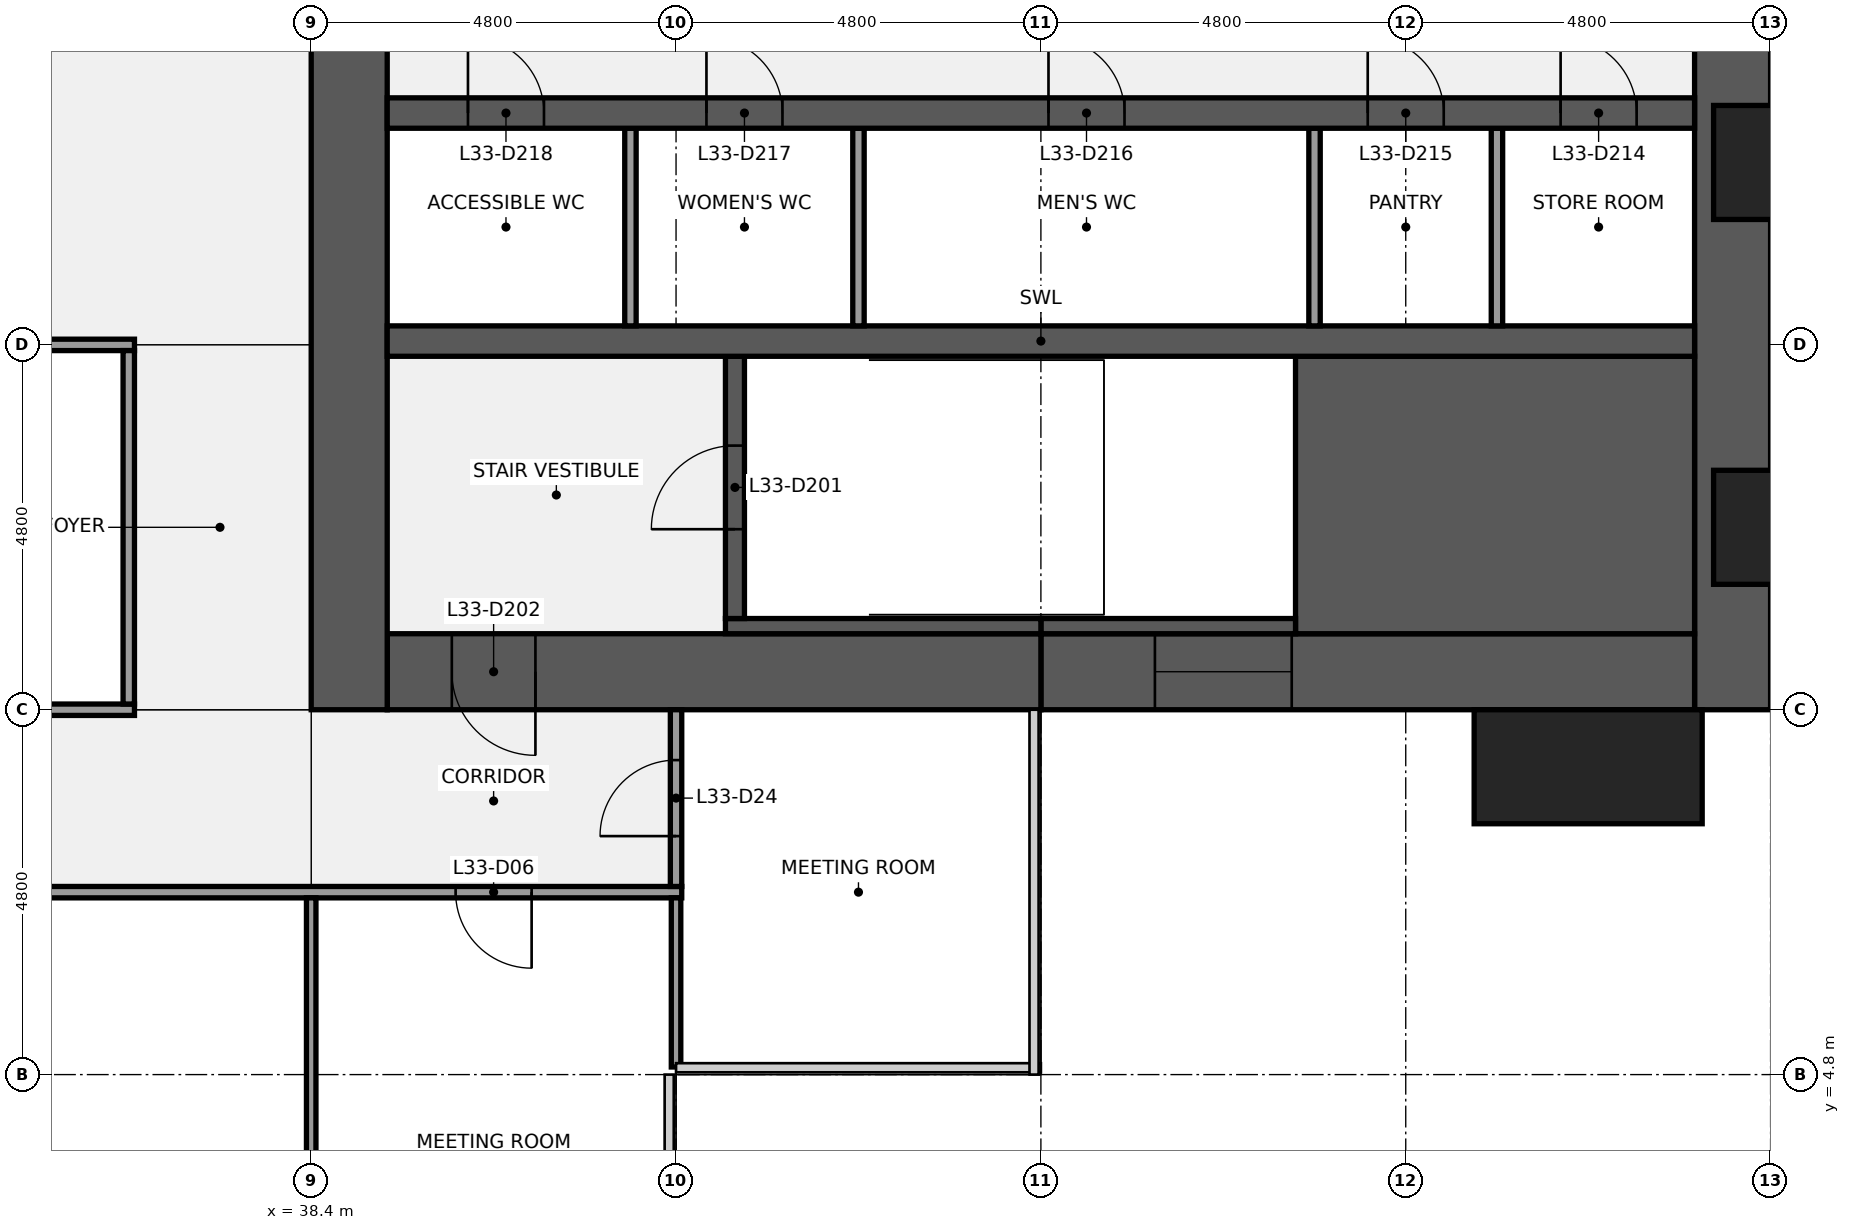
"""IFC4 building model, lengths in metres.
Left out: names, types, materials, properties, quantities, classifications, styles, units other than length and angle.
Written with IfcOpenShell. Run it as: python <this file> out.ifc"""

import sys

from ifc_helpers import new_model, si_unit, direction, frame, frame_2d, origin, origin_2d, place, context, subcontext, project, spatial, rectangle, extrude, element, fill, save


model = new_model("IFC4")
c1 = context("Model", 3, precision=1e-05, world=origin(), true_north=direction((0.0, 1.0)))
c2 = subcontext(c1, "Body", "Model", "MODEL_VIEW")
j1 = project(units=[si_unit("LENGTHUNIT", "METRE"), si_unit("PLANEANGLEUNIT", "RADIAN")], contexts=[c1])
p1 = place(None, origin())
s1 = spatial("IfcSite", under=j1, at=p1, CompositionType="ELEMENT")
p2 = place(p1, origin())
s2 = spatial("IfcBuilding", under=s1, at=p2, CompositionType="ELEMENT")
p3 = place(p2, frame((0.0, 0.0, 152.1)))
s3 = spatial("IfcBuildingStorey", under=s2, at=p3, CompositionType="ELEMENT", Elevation=152.1)
p4 = place(p3, frame((57.1, 38.4, 0.0), z_axis=(0.0, 0.0, 1.0), x_axis=(0.0, -1.0, 0.0)))
e1 = element("IfcWall", 1, at=p4, inside=s3, PredefinedType="SHEAR", context=c2, shape_type="SweptSolid", body=[
    extrude(rectangle(XDim=28.8, YDim=1.0, at=frame_2d((14.4, 0.0))), origin(), (0.0, 0.0, 1.0), 3.84),
])
p5 = place(p4, frame((18.45, 0.0, 0.9)))
e2 = element("IfcOpeningElement", 2, at=p5, cuts=e1, PredefinedType="OPENING", context=c2, shape_type="SweptSolid", body=[
    extrude(rectangle(XDim=1.5, YDim=1.5, at=frame_2d((0.75, 0.75))), frame((0.0, 0.51, 0.0), z_axis=(0.0, -1.0, 0.0), x_axis=(1.0, 0.0, 0.0)), (0.0, 0.0, 1.0), 1.02),
])
p6 = place(p4, frame((8.85, 0.0, 0.9)))
e3 = element("IfcOpeningElement", 3, at=p6, cuts=e1, PredefinedType="OPENING", context=c2, shape_type="SweptSolid", body=[
    extrude(rectangle(XDim=1.5, YDim=1.5, at=frame_2d((0.75, 0.75))), frame((0.0, 0.51, 0.0), z_axis=(0.0, -1.0, 0.0), x_axis=(1.0, 0.0, 0.0)), (0.0, 0.0, 1.0), 1.02),
])
p7 = place(p3, frame((56.6, 10.1, 0.0), z_axis=(0.0, 0.0, 1.0), x_axis=(-1.0, 0.0, 0.0)))
e4 = element("IfcWall", 4, at=p7, inside=s3, PredefinedType="SHEAR", context=c2, shape_type="SweptSolid", body=[
    extrude(rectangle(XDim=8.6, YDim=1.0, at=frame_2d((4.3, 0.0))), origin(), (0.0, 0.0, 1.0), 3.84),
])
p8 = place(p7, frame((5.3, 0.0, 0.9)))
e5 = element("IfcOpeningElement", 5, at=p8, cuts=e4, PredefinedType="OPENING", context=c2, shape_type="SweptSolid", body=[
    extrude(rectangle(XDim=1.8, YDim=1.5, at=frame_2d((0.9, 0.75))), frame((0.0, 0.51, 0.0), z_axis=(0.0, -1.0, 0.0), x_axis=(1.0, 0.0, 0.0)), (0.0, 0.0, 1.0), 1.02),
])
p9 = place(p3, frame((48.0, 10.1, 0.0), z_axis=(0.0, 0.0, 1.0), x_axis=(-1.0, 0.0, 0.0)))
e6 = element("IfcWall", 6, at=p9, inside=s3, PredefinedType="SHEAR", context=c2, shape_type="SweptSolid", body=[
    extrude(rectangle(XDim=8.6, YDim=1.0, at=frame_2d((4.3, 0.0))), origin(), (0.0, 0.0, 1.0), 3.84),
])
p10 = place(p9, frame((6.65, 0.0, 0.0)))
e7 = element("IfcOpeningElement", 7, at=p10, cuts=e6, PredefinedType="OPENING", context=c2, shape_type="SweptSolid", body=[
    extrude(rectangle(XDim=1.1, YDim=2.1, at=frame_2d((0.55, 1.05))), frame((0.0, 0.51, 0.0), z_axis=(0.0, -1.0, 0.0), x_axis=(1.0, 0.0, 0.0)), (0.0, 0.0, 1.0), 1.02),
])
p11 = place(p3, frame((38.9, 9.6, 0.0), z_axis=(0.0, 0.0, 1.0), x_axis=(0.0, 1.0, 0.0)))
e8 = element("IfcWall", 8, at=p11, inside=s3, PredefinedType="SHEAR", context=c2, shape_type="SweptSolid", body=[
    extrude(rectangle(XDim=28.8, YDim=1.0, at=frame_2d((14.4, 0.0))), origin(), (0.0, 0.0, 1.0), 3.84),
])
p12 = place(p11, frame((8.7, 0.0, 0.0)))
e9 = element("IfcOpeningElement", 9, at=p12, cuts=e8, PredefinedType="OPENING", context=c2, shape_type="SweptSolid", body=[
    extrude(rectangle(XDim=1.8, YDim=2.1, at=frame_2d((0.9, 1.05))), frame((0.0, 0.51, 0.0), z_axis=(0.0, -1.0, 0.0), x_axis=(1.0, 0.0, 0.0)), (0.0, 0.0, 1.0), 1.02),
])
p13 = place(p11, frame((18.3, 0.0, 0.0)))
e10 = element("IfcOpeningElement", 10, at=p13, cuts=e8, PredefinedType="OPENING", context=c2, shape_type="SweptSolid", body=[
    extrude(rectangle(XDim=1.8, YDim=2.1, at=frame_2d((0.9, 1.05))), frame((0.0, 0.51, 0.0), z_axis=(0.0, -1.0, 0.0), x_axis=(1.0, 0.0, 0.0)), (0.0, 0.0, 1.0), 1.02),
])
p14 = place(p3, frame((51.35, 12.425, 0.0), z_axis=(0.0, 0.0, 1.0), x_axis=(1.0, 0.0, 0.0)))
e11 = element("IfcWall", 11, at=p14, inside=s3, PredefinedType="SHEAR", context=c2, shape_type="SweptSolid", body=[
    extrude(rectangle(XDim=5.25, YDim=3.65, at=frame_2d((2.625, 0.0))), origin(), (0.0, 0.0, 1.0), 3.84),
])
p15 = place(p3, frame((48.0, 10.7, 0.0), z_axis=(0.0, 0.0, 1.0), x_axis=(1.0, 0.0, 0.0)))
e12 = element("IfcWall", 12, at=p15, inside=s3, PredefinedType="SHEAR", context=c2, shape_type="SweptSolid", body=[
    extrude(rectangle(XDim=3.35, YDim=0.2, at=frame_2d((1.675, 0.0))), origin(), (0.0, 0.0, 1.0), 3.84),
])
p16 = place(p3, frame((43.85, 10.7, 0.0), z_axis=(0.0, 0.0, 1.0), x_axis=(1.0, 0.0, 0.0)))
e13 = element("IfcWall", 13, at=p16, inside=s3, PredefinedType="SHEAR", context=c2, shape_type="SweptSolid", body=[
    extrude(rectangle(XDim=4.15, YDim=0.2, at=frame_2d((2.075, 0.0))), origin(), (0.0, 0.0, 1.0), 3.84),
])
p17 = place(p3, frame((43.975, 10.8, 0.0), z_axis=(0.0, 0.0, 1.0), x_axis=(0.0, 1.0, 0.0)))
e14 = element("IfcWall", 14, at=p17, inside=s3, PredefinedType="SHEAR", context=c2, shape_type="SweptSolid", body=[
    extrude(rectangle(XDim=3.45, YDim=0.25, at=frame_2d((1.725, 0.0))), origin(), (0.0, 0.0, 1.0), 3.84),
])
p18 = place(p17, frame((1.175, 0.0, 0.0)))
e15 = element("IfcOpeningElement", 15, at=p18, cuts=e14, PredefinedType="OPENING", context=c2, shape_type="SweptSolid", body=[
    extrude(rectangle(XDim=1.1, YDim=2.1, at=frame_2d((0.55, 1.05))), frame((0.0, 0.135, 0.0), z_axis=(0.0, -1.0, 0.0), x_axis=(1.0, 0.0, 0.0)), (0.0, 0.0, 1.0), 0.27),
])
p19 = place(p3, frame((39.4, 14.45, 0.0), z_axis=(0.0, 0.0, 1.0), x_axis=(1.0, 0.0, 0.0)))
e16 = element("IfcWall", 16, at=p19, inside=s3, PredefinedType="SHEAR", context=c2, shape_type="SweptSolid", body=[
    extrude(rectangle(XDim=17.2, YDim=0.4, at=frame_2d((8.6, 0.0))), origin(), (0.0, 0.0, 1.0), 3.84),
])
for number, where, z_axis, x_axis in (
    (17, (54.0, 14.65, 0.0), (0.0, 0.0, 1.0), (0.0, 1.0, 0.0)),
    (18, (51.6, 14.65, 0.0), (0.0, 0.0, 1.0), (0.0, 1.0, 0.0)),
    (19, (45.6, 14.65, 0.0), (0.0, 0.0, 1.0), (0.0, 1.0, 0.0)),
    (20, (42.6, 14.65, 0.0), (0.0, 0.0, 1.0), (0.0, 1.0, 0.0)),
):
    element("IfcWall", number, at=place(p3, frame(where, z_axis=z_axis, x_axis=x_axis)), inside=s3, PredefinedType="PARTITIONING", context=c2, shape_type="SweptSolid", body=[
        extrude(rectangle(XDim=2.6, YDim=0.15, at=frame_2d((1.3, 0.0))), origin(), (0.0, 0.0, 1.0), 3.84),
    ])
p20 = place(p3, frame((39.4, 17.45, 0.0), z_axis=(0.0, 0.0, 1.0), x_axis=(1.0, 0.0, 0.0)))
e21 = element("IfcWall", 21, at=p20, inside=s3, PredefinedType="SHEAR", context=c2, shape_type="SweptSolid", body=[
    extrude(rectangle(XDim=17.2, YDim=0.4, at=frame_2d((8.6, 0.0))), origin(), (0.0, 0.0, 1.0), 3.84),
])
p21 = place(p20, frame((15.438, 0.0, 0.0)))
e22 = element("IfcOpeningElement", 22, at=p21, cuts=e21, PredefinedType="OPENING", context=c2, shape_type="SweptSolid", body=[
    extrude(rectangle(XDim=1.0, YDim=2.1, at=frame_2d((0.5, 1.05))), frame((0.0, 0.21, 0.0), z_axis=(0.0, -1.0, 0.0), x_axis=(1.0, 0.0, 0.0)), (0.0, 0.0, 1.0), 0.42),
])
p22 = place(p20, frame((12.9, 0.0, 0.0)))
e23 = element("IfcOpeningElement", 23, at=p22, cuts=e21, PredefinedType="OPENING", context=c2, shape_type="SweptSolid", body=[
    extrude(rectangle(XDim=1.0, YDim=2.1, at=frame_2d((0.5, 1.05))), frame((0.0, 0.21, 0.0), z_axis=(0.0, -1.0, 0.0), x_axis=(1.0, 0.0, 0.0)), (0.0, 0.0, 1.0), 0.42),
])
p23 = place(p20, frame((8.7, 0.0, 0.0)))
e24 = element("IfcOpeningElement", 24, at=p23, cuts=e21, PredefinedType="OPENING", context=c2, shape_type="SweptSolid", body=[
    extrude(rectangle(XDim=1.0, YDim=2.1, at=frame_2d((0.5, 1.05))), frame((0.0, 0.21, 0.0), z_axis=(0.0, -1.0, 0.0), x_axis=(1.0, 0.0, 0.0)), (0.0, 0.0, 1.0), 0.42),
])
p24 = place(p20, frame((4.2, 0.0, 0.0)))
e25 = element("IfcOpeningElement", 25, at=p24, cuts=e21, PredefinedType="OPENING", context=c2, shape_type="SweptSolid", body=[
    extrude(rectangle(XDim=1.0, YDim=2.1, at=frame_2d((0.5, 1.05))), frame((0.0, 0.21, 0.0), z_axis=(0.0, -1.0, 0.0), x_axis=(1.0, 0.0, 0.0)), (0.0, 0.0, 1.0), 0.42),
])
p25 = place(p20, frame((1.062, 0.0, 0.0)))
e26 = element("IfcOpeningElement", 26, at=p25, cuts=e21, PredefinedType="OPENING", context=c2, shape_type="SweptSolid", body=[
    extrude(rectangle(XDim=1.0, YDim=2.1, at=frame_2d((0.5, 1.05))), frame((0.0, 0.21, 0.0), z_axis=(0.0, -1.0, 0.0), x_axis=(1.0, 0.0, 0.0)), (0.0, 0.0, 1.0), 0.42),
])
p26 = place(p3, frame((14.325, 7.2, 0.0), z_axis=(0.0, 0.0, 1.0), x_axis=(1.0, 0.0, 0.0)))
e27 = element("IfcWall", 27, at=p26, inside=s3, PredefinedType="PARTITIONING", context=c2, shape_type="SweptSolid", body=[
    extrude(rectangle(XDim=28.95, YDim=0.15, at=frame_2d((14.475, 0.0))), origin(), (0.0, 0.0, 1.0), 2.936),
])
p27 = place(p26, frame((1.975, 0.0, 0.0)))
e28 = element("IfcOpeningElement", 28, at=p27, cuts=e27, PredefinedType="OPENING", context=c2, shape_type="SweptSolid", body=[
    extrude(rectangle(XDim=1.0, YDim=2.1, at=frame_2d((0.5, 1.05))), frame((0.0, 0.085, 0.0), z_axis=(0.0, -1.0, 0.0), x_axis=(1.0, 0.0, 0.0)), (0.0, 0.0, 1.0), 0.17),
])
p28 = place(p26, frame((5.575, 0.0, 0.0)))
e29 = element("IfcOpeningElement", 29, at=p28, cuts=e27, PredefinedType="OPENING", context=c2, shape_type="SweptSolid", body=[
    extrude(rectangle(XDim=1.0, YDim=2.1, at=frame_2d((0.5, 1.05))), frame((0.0, 0.085, 0.0), z_axis=(0.0, -1.0, 0.0), x_axis=(1.0, 0.0, 0.0)), (0.0, 0.0, 1.0), 0.17),
])
p29 = place(p26, frame((9.175, 0.0, 0.0)))
e30 = element("IfcOpeningElement", 30, at=p29, cuts=e27, PredefinedType="OPENING", context=c2, shape_type="SweptSolid", body=[
    extrude(rectangle(XDim=1.0, YDim=2.1, at=frame_2d((0.5, 1.05))), frame((0.0, 0.085, 0.0), z_axis=(0.0, -1.0, 0.0), x_axis=(1.0, 0.0, 0.0)), (0.0, 0.0, 1.0), 0.17),
])
p30 = place(p26, frame((12.775, 0.0, 0.0)))
e31 = element("IfcOpeningElement", 31, at=p30, cuts=e27, PredefinedType="OPENING", context=c2, shape_type="SweptSolid", body=[
    extrude(rectangle(XDim=1.0, YDim=2.1, at=frame_2d((0.5, 1.05))), frame((0.0, 0.085, 0.0), z_axis=(0.0, -1.0, 0.0), x_axis=(1.0, 0.0, 0.0)), (0.0, 0.0, 1.0), 0.17),
])
p31 = place(p26, frame((18.775, 0.0, 0.0)))
e32 = element("IfcOpeningElement", 32, at=p31, cuts=e27, PredefinedType="OPENING", context=c2, shape_type="SweptSolid", body=[
    extrude(rectangle(XDim=1.0, YDim=2.1, at=frame_2d((0.5, 1.05))), frame((0.0, 0.085, 0.0), z_axis=(0.0, -1.0, 0.0), x_axis=(1.0, 0.0, 0.0)), (0.0, 0.0, 1.0), 0.17),
])
p32 = place(p26, frame((25.975, 0.0, 0.0)))
e33 = element("IfcOpeningElement", 33, at=p32, cuts=e27, PredefinedType="OPENING", context=c2, shape_type="SweptSolid", body=[
    extrude(rectangle(XDim=1.0, YDim=2.1, at=frame_2d((0.5, 1.05))), frame((0.0, 0.085, 0.0), z_axis=(0.0, -1.0, 0.0), x_axis=(1.0, 0.0, 0.0)), (0.0, 0.0, 1.0), 0.17),
])
p33 = place(p3, frame((21.525, 9.6, 0.0), z_axis=(0.0, 0.0, 1.0), x_axis=(1.0, 0.0, 0.0)))
e34 = element("IfcWall", 34, at=p33, inside=s3, PredefinedType="PARTITIONING", context=c2, shape_type="SweptSolid", body=[
    extrude(rectangle(XDim=14.55, YDim=0.15, at=frame_2d((7.275, 0.0))), origin(), (0.0, 0.0, 1.0), 2.936),
])
p34 = place(p33, frame((3.175, 0.0, 0.0)))
e35 = element("IfcOpeningElement", 35, at=p34, cuts=e34, PredefinedType="OPENING", context=c2, shape_type="SweptSolid", body=[
    extrude(rectangle(XDim=1.0, YDim=2.1, at=frame_2d((0.5, 1.05))), frame((0.0, 0.085, 0.0), z_axis=(0.0, -1.0, 0.0), x_axis=(1.0, 0.0, 0.0)), (0.0, 0.0, 1.0), 0.17),
])
p35 = place(p33, frame((10.375, 0.0, 0.0)))
e36 = element("IfcOpeningElement", 36, at=p35, cuts=e34, PredefinedType="OPENING", context=c2, shape_type="SweptSolid", body=[
    extrude(rectangle(XDim=1.0, YDim=2.1, at=frame_2d((0.5, 1.05))), frame((0.0, 0.085, 0.0), z_axis=(0.0, -1.0, 0.0), x_axis=(1.0, 0.0, 0.0)), (0.0, 0.0, 1.0), 0.17),
])
p36 = place(p3, frame((31.275, 14.4, 0.0), z_axis=(0.0, 0.0, 1.0), x_axis=(1.0, 0.0, 0.0)))
e37 = element("IfcWall", 37, at=p36, inside=s3, PredefinedType="PARTITIONING", context=c2, shape_type="SweptSolid", body=[
    extrude(rectangle(XDim=4.8, YDim=0.15, at=frame_2d((2.4, 0.0))), origin(), (0.0, 0.0, 1.0), 2.936),
])
p37 = place(p3, frame((36.0, 9.675, 0.0), z_axis=(0.0, 0.0, 1.0), x_axis=(0.0, 1.0, 0.0)))
e38 = element("IfcWall", 38, at=p37, inside=s3, PredefinedType="PARTITIONING", context=c2, shape_type="SweptSolid", body=[
    extrude(rectangle(XDim=4.65, YDim=0.15, at=frame_2d((2.325, 0.0))), origin(), (0.0, 0.0, 1.0), 2.936),
])
p38 = place(p3, frame((38.4, 0.6, 0.0), z_axis=(0.0, 0.0, 1.0), x_axis=(0.0, 1.0, 0.0)))
e39 = element("IfcWall", 39, at=p38, inside=s3, PredefinedType="PARTITIONING", context=c2, shape_type="SweptSolid", body=[
    extrude(rectangle(XDim=6.525, YDim=0.125, at=frame_2d((3.262, 0.0))), origin(), (0.0, 0.0, 1.0), 2.936),
])
p39 = place(p3, frame((43.2, 4.9, 0.0), z_axis=(0.0, 0.0, 1.0), x_axis=(0.0, 1.0, 0.0)))
e40 = element("IfcWall", 40, at=p39, inside=s3, PredefinedType="PARTITIONING", context=c2, shape_type="SweptSolid", body=[
    extrude(rectangle(XDim=2.225, YDim=0.125, at=frame_2d((1.113, 0.0))), origin(), (0.0, 0.0, 1.0), 2.936),
])
p40 = place(p3, frame((43.2, 7.275, 0.0), z_axis=(0.0, 0.0, 1.0), x_axis=(0.0, 1.0, 0.0)))
e41 = element("IfcWall", 41, at=p40, inside=s3, PredefinedType="PARTITIONING", context=c2, shape_type="SweptSolid", body=[
    extrude(rectangle(XDim=2.325, YDim=0.15, at=frame_2d((1.163, 0.0))), origin(), (0.0, 0.0, 1.0), 2.936),
])
p41 = place(p40, frame((0.663, 0.0, 0.0)))
e42 = element("IfcOpeningElement", 42, at=p41, cuts=e41, PredefinedType="OPENING", context=c2, shape_type="SweptSolid", body=[
    extrude(rectangle(XDim=1.0, YDim=2.1, at=frame_2d((0.5, 1.05))), frame((0.0, 0.085, 0.0), z_axis=(0.0, -1.0, 0.0), x_axis=(1.0, 0.0, 0.0)), (0.0, 0.0, 1.0), 0.17),
])
p42 = place(p3, frame((55.2, 8.85, 0.0), z_axis=(0.0, 0.0, 1.0), x_axis=(1.0, 0.0, 0.0)))
e43 = element("IfcColumn", 43, at=p42, inside=s3, PredefinedType="PILASTER", context=c2, shape_type="SweptSolid", body=[
    extrude(rectangle(XDim=3.0, YDim=1.5, at=origin_2d()), origin(), (0.0, 0.0, 1.0), 4.0),
])
p43 = place(p18, origin())
e44 = element("IfcDoor", 44, at=p43, inside=s3, OperationType="SINGLE_SWING_LEFT", PredefinedType="DOOR", context=c2, shape_type="SweptSolid", body=[
    extrude(rectangle(XDim=1.1, YDim=2.1, at=frame_2d((0.55, 1.05))), frame((0.0, 0.025, 0.0), z_axis=(0.0, -1.0, 0.0), x_axis=(1.0, 0.0, 0.0)), (0.0, 0.0, 1.0), 0.05),
])
fill(e15, e44)
p44 = place(p10, origin())
e45 = element("IfcDoor", 45, at=p44, inside=s3, OperationType="SINGLE_SWING_LEFT", PredefinedType="DOOR", context=c2, shape_type="SweptSolid", body=[
    extrude(rectangle(XDim=1.1, YDim=2.1, at=frame_2d((0.55, 1.05))), frame((0.0, 0.025, 0.0), z_axis=(0.0, -1.0, 0.0), x_axis=(1.0, 0.0, 0.0)), (0.0, 0.0, 1.0), 0.05),
])
fill(e7, e45)
p45 = place(p21, origin())
e46 = element("IfcDoor", 46, at=p45, inside=s3, OperationType="SINGLE_SWING_LEFT", PredefinedType="DOOR", context=c2, shape_type="SweptSolid", body=[
    extrude(rectangle(XDim=1.0, YDim=2.1, at=frame_2d((0.5, 1.05))), frame((0.0, 0.025, 0.0), z_axis=(0.0, -1.0, 0.0), x_axis=(1.0, 0.0, 0.0)), (0.0, 0.0, 1.0), 0.05),
])
fill(e22, e46)
p46 = place(p22, origin())
e47 = element("IfcDoor", 47, at=p46, inside=s3, OperationType="SINGLE_SWING_LEFT", PredefinedType="DOOR", context=c2, shape_type="SweptSolid", body=[
    extrude(rectangle(XDim=1.0, YDim=2.1, at=frame_2d((0.5, 1.05))), frame((0.0, 0.025, 0.0), z_axis=(0.0, -1.0, 0.0), x_axis=(1.0, 0.0, 0.0)), (0.0, 0.0, 1.0), 0.05),
])
fill(e23, e47)
p47 = place(p23, origin())
e48 = element("IfcDoor", 48, at=p47, inside=s3, OperationType="SINGLE_SWING_LEFT", PredefinedType="DOOR", context=c2, shape_type="SweptSolid", body=[
    extrude(rectangle(XDim=1.0, YDim=2.1, at=frame_2d((0.5, 1.05))), frame((0.0, 0.025, 0.0), z_axis=(0.0, -1.0, 0.0), x_axis=(1.0, 0.0, 0.0)), (0.0, 0.0, 1.0), 0.05),
])
fill(e24, e48)
p48 = place(p24, origin())
e49 = element("IfcDoor", 49, at=p48, inside=s3, OperationType="SINGLE_SWING_LEFT", PredefinedType="DOOR", context=c2, shape_type="SweptSolid", body=[
    extrude(rectangle(XDim=1.0, YDim=2.1, at=frame_2d((0.5, 1.05))), frame((0.0, 0.025, 0.0), z_axis=(0.0, -1.0, 0.0), x_axis=(1.0, 0.0, 0.0)), (0.0, 0.0, 1.0), 0.05),
])
fill(e25, e49)
p49 = place(p25, origin())
e50 = element("IfcDoor", 50, at=p49, inside=s3, OperationType="SINGLE_SWING_LEFT", PredefinedType="DOOR", context=c2, shape_type="SweptSolid", body=[
    extrude(rectangle(XDim=1.0, YDim=2.1, at=frame_2d((0.5, 1.05))), frame((0.0, 0.025, 0.0), z_axis=(0.0, -1.0, 0.0), x_axis=(1.0, 0.0, 0.0)), (0.0, 0.0, 1.0), 0.05),
])
fill(e26, e50)
p50 = place(p8, origin())
e51 = element("IfcWindow", 51, at=p50, inside=s3, PartitioningType="SINGLE_PANEL", PredefinedType="WINDOW", context=c2, shape_type="SweptSolid", body=[
    extrude(rectangle(XDim=1.8, YDim=1.5, at=frame_2d((0.9, 0.75))), frame((0.0, 0.03, 0.0), z_axis=(0.0, -1.0, 0.0), x_axis=(1.0, 0.0, 0.0)), (0.0, 0.0, 1.0), 0.06),
])
fill(e5, e51)
p51 = place(p32, origin())
e52 = element("IfcDoor", 52, at=p51, inside=s3, OperationType="SINGLE_SWING_RIGHT", PredefinedType="DOOR", context=c2, shape_type="SweptSolid", body=[
    extrude(rectangle(XDim=1.0, YDim=2.1, at=frame_2d((0.5, 1.05))), frame((0.0, 0.025, 0.0), z_axis=(0.0, -1.0, 0.0), x_axis=(1.0, 0.0, 0.0)), (0.0, 0.0, 1.0), 0.05),
])
fill(e33, e52)
p52 = place(p41, origin())
e53 = element("IfcDoor", 53, at=p52, inside=s3, OperationType="SINGLE_SWING_LEFT", PredefinedType="DOOR", context=c2, shape_type="SweptSolid", body=[
    extrude(rectangle(XDim=1.0, YDim=2.1, at=frame_2d((0.5, 1.05))), frame((0.0, 0.025, 0.0), z_axis=(0.0, -1.0, 0.0), x_axis=(1.0, 0.0, 0.0)), (0.0, 0.0, 1.0), 0.05),
])
fill(e42, e53)
save(model, sys.argv[1])
